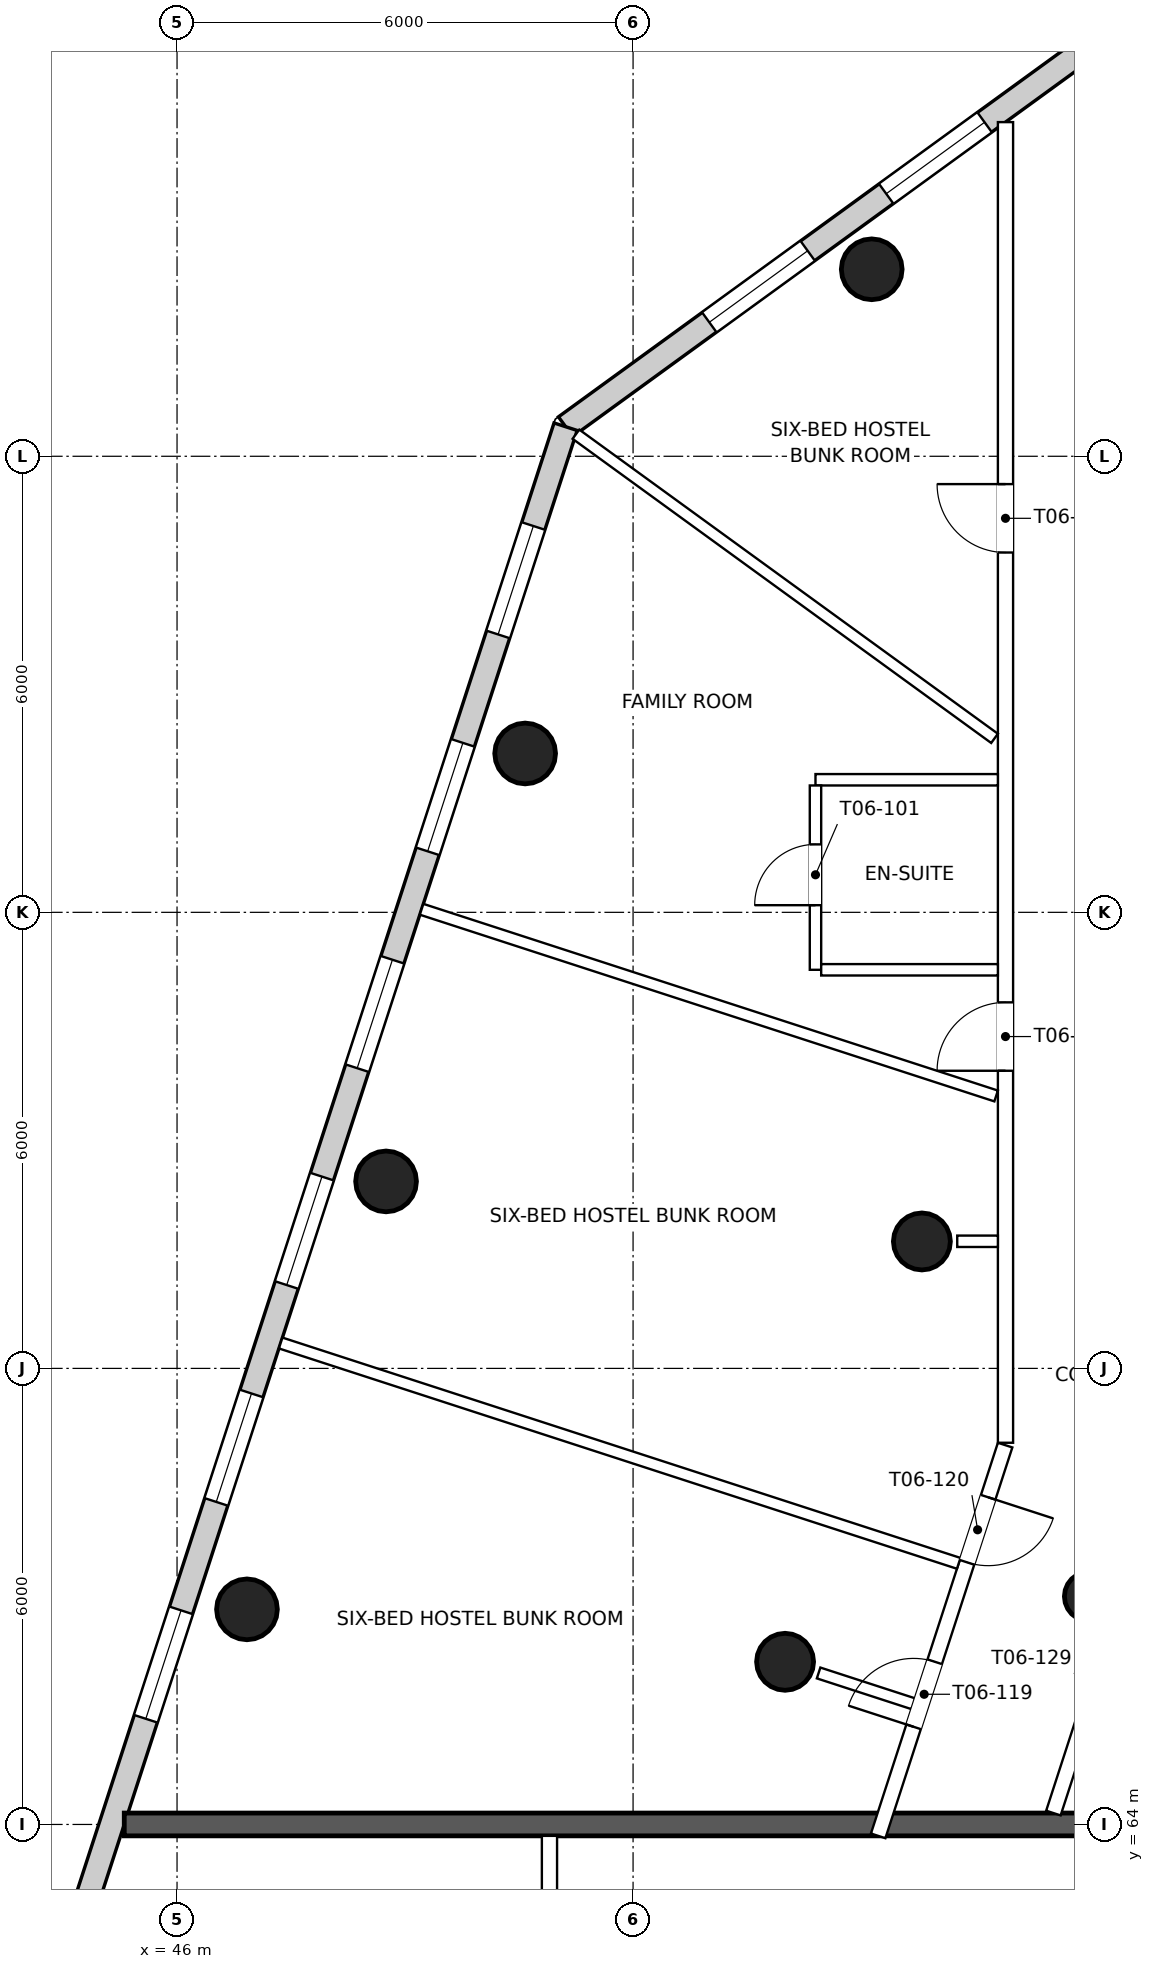
"""IFC4 building model, lengths in metres.
Left out: names, types, materials, properties, quantities, classifications, styles, units other than length and angle.
Written with IfcOpenShell. Run it as: python <this file> out.ifc"""

import sys

from ifc_helpers import new_model, si_unit, direction, frame, frame_2d, origin, origin_2d, place, context, subcontext, project, spatial, rectangle, circle, extrude, element, fill, save


model = new_model("IFC4")
c1 = context("Model", 3, precision=1e-05, world=origin(), true_north=direction((0.0, 1.0)))
c2 = subcontext(c1, "Body", "Model", "MODEL_VIEW")
j1 = project(units=[si_unit("LENGTHUNIT", "METRE"), si_unit("PLANEANGLEUNIT", "RADIAN")], contexts=[c1])
p1 = place(None, origin())
s1 = spatial("IfcSite", under=j1, at=p1, CompositionType="ELEMENT")
p2 = place(p1, origin())
s2 = spatial("IfcBuilding", under=s1, at=p2, CompositionType="ELEMENT")
p3 = place(p2, frame((0.0, 0.0, 98.6)))
s3 = spatial("IfcBuildingStorey", under=s2, at=p3, CompositionType="ELEMENT", Elevation=98.6)
for number, where, z_axis, x_axis in (
    (1, (55.14, 84.46, 0.0), (0.0, 0.0, 1.0), (1.0, 0.0, 0.0)),
    (2, (50.58, 78.09, 0.0), (0.0, 0.0, 1.0), (1.0, 0.0, 0.0)),
    (3, (48.75, 72.46, 0.0), (0.0, 0.0, 1.0), (1.0, 0.0, 0.0)),
    (4, (46.92, 66.83, 0.0), (0.0, 0.0, 1.0), (1.0, 0.0, 0.0)),
):
    element("IfcColumn", number, at=place(p3, frame(where, z_axis=z_axis, x_axis=x_axis)), inside=s3, PredefinedType="COLUMN", context=c2, shape_type="SweptSolid", body=[
        extrude(circle(Radius=0.4, at=origin_2d()), origin(), (0.0, 0.0, 1.0), 3.9),
    ])
for number, where, z_axis, x_axis in (
    (5, (55.8, 71.67, 0.0), (0.0, 0.0, 1.0), (1.0, 0.0, 0.0)),
    (6, (54.0, 66.14, 0.0), (0.0, 0.0, 1.0), (1.0, 0.0, 0.0)),
):
    element("IfcColumn", number, at=place(p3, frame(where, z_axis=z_axis, x_axis=x_axis)), inside=s3, PredefinedType="COLUMN", context=c2, shape_type="SweptSolid", body=[
        extrude(circle(Radius=0.375, at=origin_2d()), origin(), (0.0, 0.0, 1.0), 3.9),
    ])
p4 = place(p3, frame((58.0, 67.0, 0.0), z_axis=(0.0, 0.0, 1.0), x_axis=(1.0, 0.0, 0.0)))
e7 = element("IfcColumn", 7, at=p4, inside=s3, PredefinedType="COLUMN", context=c2, shape_type="SweptSolid", body=[
    extrude(circle(Radius=0.325, at=origin_2d()), origin(), (0.0, 0.0, 1.0), 3.9),
])
p5 = place(p3, frame((58.615, 87.84, 0.0), z_axis=(0.0, 0.0, 1.0), x_axis=(-0.809009213142, -0.587795962092, 0.0)))
e8 = element("IfcWall", 8, at=p5, inside=s3, PredefinedType="SOLIDWALL", context=c2, shape_type="SweptSolid", body=[
    extrude(rectangle(XDim=9.274, YDim=0.32, at=frame_2d((4.637, 0.0))), origin(), (0.0, 0.0, 1.0), 3.6),
])
p6 = place(p5, frame((2.46, 0.0, 0.9)))
e9 = element("IfcOpeningElement", 9, at=p6, cuts=e8, PredefinedType="OPENING", context=c2, shape_type="SweptSolid", body=[
    extrude(rectangle(XDim=1.6, YDim=1.8, at=frame_2d((0.8, 0.9))), frame((0.0, 0.17, 0.0), z_axis=(0.0, -1.0, 0.0), x_axis=(1.0, 0.0, 0.0)), (0.0, 0.0, 1.0), 0.34),
])
p7 = place(p5, frame((5.337, 0.0, 0.9)))
e10 = element("IfcOpeningElement", 10, at=p7, cuts=e8, PredefinedType="OPENING", context=c2, shape_type="SweptSolid", body=[
    extrude(rectangle(XDim=1.6, YDim=1.8, at=frame_2d((0.8, 0.9))), frame((0.0, 0.17, 0.0), z_axis=(0.0, -1.0, 0.0), x_axis=(1.0, 0.0, 0.0)), (0.0, 0.0, 1.0), 0.34),
])
p8 = place(p3, frame((51.112, 82.389, 0.0), z_axis=(0.0, 0.0, 1.0), x_axis=(-0.309018577053, -0.95105600205, 0.0)))
e11 = element("IfcWall", 11, at=p8, inside=s3, PredefinedType="SOLIDWALL", context=c2, shape_type="SweptSolid", body=[
    extrude(rectangle(XDim=22.247, YDim=0.32, at=frame_2d((11.124, 0.0))), origin(), (0.0, 0.0, 1.0), 3.6),
])
p9 = place(p8, frame((1.374, 0.0, 0.9)))
e12 = element("IfcOpeningElement", 12, at=p9, cuts=e11, PredefinedType="OPENING", context=c2, shape_type="SweptSolid", body=[
    extrude(rectangle(XDim=1.5, YDim=1.8, at=frame_2d((0.75, 0.9))), frame((0.0, 0.17, 0.0), z_axis=(0.0, -1.0, 0.0), x_axis=(1.0, 0.0, 0.0)), (0.0, 0.0, 1.0), 0.34),
])
p10 = place(p8, frame((4.374, 0.0, 0.9)))
e13 = element("IfcOpeningElement", 13, at=p10, cuts=e11, PredefinedType="OPENING", context=c2, shape_type="SweptSolid", body=[
    extrude(rectangle(XDim=1.5, YDim=1.8, at=frame_2d((0.75, 0.9))), frame((0.0, 0.17, 0.0), z_axis=(0.0, -1.0, 0.0), x_axis=(1.0, 0.0, 0.0)), (0.0, 0.0, 1.0), 0.34),
])
p11 = place(p8, frame((7.374, 0.0, 0.9)))
e14 = element("IfcOpeningElement", 14, at=p11, cuts=e11, PredefinedType="OPENING", context=c2, shape_type="SweptSolid", body=[
    extrude(rectangle(XDim=1.5, YDim=1.8, at=frame_2d((0.75, 0.9))), frame((0.0, 0.17, 0.0), z_axis=(0.0, -1.0, 0.0), x_axis=(1.0, 0.0, 0.0)), (0.0, 0.0, 1.0), 0.34),
])
p12 = place(p8, frame((10.374, 0.0, 0.9)))
e15 = element("IfcOpeningElement", 15, at=p12, cuts=e11, PredefinedType="OPENING", context=c2, shape_type="SweptSolid", body=[
    extrude(rectangle(XDim=1.5, YDim=1.8, at=frame_2d((0.75, 0.9))), frame((0.0, 0.17, 0.0), z_axis=(0.0, -1.0, 0.0), x_axis=(1.0, 0.0, 0.0)), (0.0, 0.0, 1.0), 0.34),
])
p13 = place(p8, frame((13.374, 0.0, 0.9)))
e16 = element("IfcOpeningElement", 16, at=p13, cuts=e11, PredefinedType="OPENING", context=c2, shape_type="SweptSolid", body=[
    extrude(rectangle(XDim=1.5, YDim=1.8, at=frame_2d((0.75, 0.9))), frame((0.0, 0.17, 0.0), z_axis=(0.0, -1.0, 0.0), x_axis=(1.0, 0.0, 0.0)), (0.0, 0.0, 1.0), 0.34),
])
p14 = place(p8, frame((16.374, 0.0, 0.9)))
e17 = element("IfcOpeningElement", 17, at=p14, cuts=e11, PredefinedType="OPENING", context=c2, shape_type="SweptSolid", body=[
    extrude(rectangle(XDim=1.5, YDim=1.8, at=frame_2d((0.75, 0.9))), frame((0.0, 0.17, 0.0), z_axis=(0.0, -1.0, 0.0), x_axis=(1.0, 0.0, 0.0)), (0.0, 0.0, 1.0), 0.34),
])
p15 = place(p3, frame((45.306, 64.0, 0.0), z_axis=(0.0, 0.0, 1.0), x_axis=(1.0, 0.0, 0.0)))
e18 = element("IfcWall", 18, at=p15, inside=s3, PredefinedType="PARTITIONING", context=c2, shape_type="SweptSolid", body=[
    extrude(rectangle(XDim=49.389, YDim=0.3, at=frame_2d((24.694, 0.0))), origin(), (0.0, 0.0, 1.0), 2.9),
])
p16 = place(p15, frame((16.331, 0.0, 0.0)))
e19 = element("IfcOpeningElement", 19, at=p16, cuts=e18, PredefinedType="OPENING", context=c2, shape_type="SweptSolid", body=[
    extrude(rectangle(XDim=2.0, YDim=2.1, at=frame_2d((1.0, 1.05))), frame((0.0, 0.16, 0.0), z_axis=(0.0, -1.0, 0.0), x_axis=(1.0, 0.0, 0.0)), (0.0, 0.0, 1.0), 0.32),
])
p17 = place(p15, frame((31.058, 0.0, 0.0)))
e20 = element("IfcOpeningElement", 20, at=p17, cuts=e18, PredefinedType="OPENING", context=c2, shape_type="SweptSolid", body=[
    extrude(rectangle(XDim=2.0, YDim=2.1, at=frame_2d((1.0, 1.05))), frame((0.0, 0.16, 0.0), z_axis=(0.0, -1.0, 0.0), x_axis=(1.0, 0.0, 0.0)), (0.0, 0.0, 1.0), 0.32),
])
p18 = place(p3, frame((55.225, 63.85, 0.0), z_axis=(0.0, 0.0, 1.0), x_axis=(0.309037048815, 0.951049999979, 0.0)))
e21 = element("IfcWall", 21, at=p18, inside=s3, PredefinedType="PARTITIONING", context=c2, shape_type="SweptSolid", body=[
    extrude(rectangle(XDim=5.405, YDim=0.2, at=frame_2d((2.703, 0.0))), origin(), (0.0, 0.0, 1.0), 3.6),
])
p19 = place(p18, frame((1.509, 0.0, 0.0)))
e22 = element("IfcOpeningElement", 22, at=p19, cuts=e21, PredefinedType="OPENING", context=c2, shape_type="SweptSolid", body=[
    extrude(rectangle(XDim=0.9, YDim=2.1, at=frame_2d((0.45, 1.05))), frame((0.0, 0.11, 0.0), z_axis=(0.0, -1.0, 0.0), x_axis=(1.0, 0.0, 0.0)), (0.0, 0.0, 1.0), 0.22),
])
p20 = place(p18, frame((3.784, 0.0, 0.0)))
e23 = element("IfcOpeningElement", 23, at=p20, cuts=e21, PredefinedType="OPENING", context=c2, shape_type="SweptSolid", body=[
    extrude(rectangle(XDim=0.9, YDim=2.1, at=frame_2d((0.45, 1.05))), frame((0.0, 0.11, 0.0), z_axis=(0.0, -1.0, 0.0), x_axis=(1.0, 0.0, 0.0)), (0.0, 0.0, 1.0), 0.22),
])
p21 = place(p3, frame((56.9, 69.022, 0.0), z_axis=(0.0, 0.0, 1.0), x_axis=(0.0, 1.0, 0.0)))
e24 = element("IfcWall", 24, at=p21, inside=s3, PredefinedType="PARTITIONING", context=c2, shape_type="SweptSolid", body=[
    extrude(rectangle(XDim=17.375, YDim=0.2, at=frame_2d((8.687, 0.0))), origin(), (0.0, 0.0, 1.0), 3.0),
])
p22 = place(p21, frame((4.894, 0.0, 0.0)))
e25 = element("IfcOpeningElement", 25, at=p22, cuts=e24, PredefinedType="OPENING", context=c2, shape_type="SweptSolid", body=[
    extrude(rectangle(XDim=0.9, YDim=2.1, at=frame_2d((0.45, 1.05))), frame((0.0, 0.11, 0.0), z_axis=(0.0, -1.0, 0.0), x_axis=(1.0, 0.0, 0.0)), (0.0, 0.0, 1.0), 0.22),
])
p23 = place(p21, frame((11.712, 0.0, 0.0)))
e26 = element("IfcOpeningElement", 26, at=p23, cuts=e24, PredefinedType="OPENING", context=c2, shape_type="SweptSolid", body=[
    extrude(rectangle(XDim=0.9, YDim=2.1, at=frame_2d((0.45, 1.05))), frame((0.0, 0.11, 0.0), z_axis=(0.0, -1.0, 0.0), x_axis=(1.0, 0.0, 0.0)), (0.0, 0.0, 1.0), 0.22),
])
p24 = place(p3, frame((50.9, 55.9, 0.0), z_axis=(0.0, 0.0, 1.0), x_axis=(0.0, 1.0, 0.0)))
e27 = element("IfcWall", 27, at=p24, inside=s3, PredefinedType="PARTITIONING", context=c2, shape_type="SweptSolid", body=[
    extrude(rectangle(XDim=7.95, YDim=0.2, at=frame_2d((3.975, 0.0))), origin(), (0.0, 0.0, 1.0), 3.6),
])
p25 = place(p24, frame((2.165, 0.0, 0.0)))
e28 = element("IfcOpeningElement", 28, at=p25, cuts=e27, PredefinedType="OPENING", context=c2, shape_type="SweptSolid", body=[
    extrude(rectangle(XDim=0.9, YDim=2.1, at=frame_2d((0.45, 1.05))), frame((0.0, 0.11, 0.0), z_axis=(0.0, -1.0, 0.0), x_axis=(1.0, 0.0, 0.0)), (0.0, 0.0, 1.0), 0.22),
])
p26 = place(p24, frame((6.228, 0.0, 0.0)))
e29 = element("IfcOpeningElement", 29, at=p26, cuts=e27, PredefinedType="OPENING", context=c2, shape_type="SweptSolid", body=[
    extrude(rectangle(XDim=0.9, YDim=2.1, at=frame_2d((0.45, 1.05))), frame((0.0, 0.11, 0.0), z_axis=(0.0, -1.0, 0.0), x_axis=(1.0, 0.0, 0.0)), (0.0, 0.0, 1.0), 0.22),
])
p27 = place(p3, frame((59.051, 68.831, 0.0), z_axis=(0.0, 0.0, 1.0), x_axis=(-0.309031112369, -0.951051928965, 0.0)))
e30 = element("IfcWall", 30, at=p27, inside=s3, PredefinedType="PARTITIONING", context=c2, shape_type="SweptSolid", body=[
    extrude(rectangle(XDim=4.922, YDim=0.2, at=frame_2d((2.461, 0.0))), origin(), (0.0, 0.0, 1.0), 3.6),
])
p28 = place(p27, frame((2.665, 0.0, 0.0)))
e31 = element("IfcOpeningElement", 31, at=p28, cuts=e30, PredefinedType="OPENING", context=c2, shape_type="SweptSolid", body=[
    extrude(rectangle(XDim=0.9, YDim=2.1, at=frame_2d((0.45, 1.05))), frame((0.0, 0.11, 0.0), z_axis=(0.0, -1.0, 0.0), x_axis=(1.0, 0.0, 0.0)), (0.0, 0.0, 1.0), 0.22),
])
p29 = place(p3, frame((51.248, 82.29, 0.0), z_axis=(0.0, 0.0, 1.0), x_axis=(0.809035290939, -0.587760068408, 0.0)))
e32 = element("IfcWall", 32, at=p29, inside=s3, PredefinedType="PARTITIONING", context=c2, shape_type="SweptSolid", body=[
    extrude(rectangle(XDim=6.808, YDim=0.15, at=frame_2d((3.404, 0.0))), origin(), (0.0, 0.0, 1.0), 3.1),
])
p30 = place(p3, frame((49.218, 76.04, 0.0), z_axis=(0.0, 0.0, 1.0), x_axis=(0.951057993494, -0.309012447986, 0.0)))
e33 = element("IfcWall", 33, at=p30, inside=s3, PredefinedType="PARTITIONING", context=c2, shape_type="SweptSolid", body=[
    extrude(rectangle(XDim=7.948, YDim=0.15, at=frame_2d((3.974, 0.0))), origin(), (0.0, 0.0, 1.0), 3.1),
])
p31 = place(p3, frame((47.364, 70.334, 0.0), z_axis=(0.0, 0.0, 1.0), x_axis=(0.951060843481, -0.309003676349, 0.0)))
e34 = element("IfcWall", 34, at=p31, inside=s3, PredefinedType="PARTITIONING", context=c2, shape_type="SweptSolid", body=[
    extrude(rectangle(XDim=9.38, YDim=0.15, at=frame_2d((4.69, 0.0))), origin(), (0.0, 0.0, 1.0), 3.0),
])
p32 = place(p3, frame((56.8, 77.744, 0.0), z_axis=(0.0, 0.0, 1.0), x_axis=(-1.0, 0.0, 0.0)))
e35 = element("IfcWall", 35, at=p32, inside=s3, PredefinedType="PARTITIONING", context=c2, shape_type="SweptSolid", body=[
    extrude(rectangle(XDim=2.4, YDim=0.15, at=frame_2d((1.2, 0.0))), origin(), (0.0, 0.0, 1.0), 3.6),
])
p33 = place(p3, frame((54.4, 75.244, 0.0), z_axis=(0.0, 0.0, 1.0), x_axis=(0.0, 1.0, 0.0)))
e36 = element("IfcWall", 36, at=p33, inside=s3, PredefinedType="PARTITIONING", context=c2, shape_type="SweptSolid", body=[
    extrude(rectangle(XDim=2.425, YDim=0.15, at=frame_2d((1.212, 0.0))), origin(), (0.0, 0.0, 1.0), 3.6),
])
p34 = place(p33, frame((0.85, 0.0, 0.0)))
e37 = element("IfcOpeningElement", 37, at=p34, cuts=e36, PredefinedType="OPENING", context=c2, shape_type="SweptSolid", body=[
    extrude(rectangle(XDim=0.8, YDim=2.1, at=frame_2d((0.4, 1.05))), frame((0.0, 0.085, 0.0), z_axis=(0.0, -1.0, 0.0), x_axis=(1.0, 0.0, 0.0)), (0.0, 0.0, 1.0), 0.17),
])
p35 = place(p3, frame((56.8, 75.244, 0.0), z_axis=(0.0, 0.0, 1.0), x_axis=(-1.0, 0.0, 0.0)))
e38 = element("IfcWall", 38, at=p35, inside=s3, PredefinedType="PARTITIONING", context=c2, shape_type="SweptSolid", body=[
    extrude(rectangle(XDim=2.325, YDim=0.15, at=frame_2d((1.163, 0.0))), origin(), (0.0, 0.0, 1.0), 3.6),
])
p36 = place(p3, frame((56.265, 71.672, 0.0), z_axis=(0.0, 0.0, 1.0), x_axis=(1.0, 0.0, 0.0)))
e39 = element("IfcWall", 39, at=p36, inside=s3, PredefinedType="PARTITIONING", context=c2, shape_type="SweptSolid", body=[
    extrude(rectangle(XDim=0.535, YDim=0.15, at=frame_2d((0.268, 0.0))), origin(), (0.0, 0.0, 1.0), 3.0),
])
p37 = place(p3, frame((54.441, 65.993, 0.0), z_axis=(0.0, 0.0, 1.0), x_axis=(0.951046418515, -0.309048070419, 0.0)))
e40 = element("IfcWall", 40, at=p37, inside=s3, PredefinedType="PARTITIONING", context=c2, shape_type="SweptSolid", body=[
    extrude(rectangle(XDim=1.307, YDim=0.15, at=frame_2d((0.654, 0.0))), origin(), (0.0, 0.0, 1.0), 3.6),
])
p38 = place(p6, origin())
e41 = element("IfcWindow", 41, at=p38, inside=s3, PartitioningType="SINGLE_PANEL", PredefinedType="WINDOW", context=c2, shape_type="SweptSolid", body=[
    extrude(rectangle(XDim=1.6, YDim=1.8, at=frame_2d((0.8, 0.9))), frame((0.0, 0.07, 0.0), z_axis=(0.0, -1.0, 0.0), x_axis=(1.0, 0.0, 0.0)), (0.0, 0.0, 1.0), 0.06),
])
fill(e9, e41)
p39 = place(p7, origin())
e42 = element("IfcWindow", 42, at=p39, inside=s3, PartitioningType="SINGLE_PANEL", PredefinedType="WINDOW", context=c2, shape_type="SweptSolid", body=[
    extrude(rectangle(XDim=1.6, YDim=1.8, at=frame_2d((0.8, 0.9))), frame((0.0, 0.07, 0.0), z_axis=(0.0, -1.0, 0.0), x_axis=(1.0, 0.0, 0.0)), (0.0, 0.0, 1.0), 0.06),
])
fill(e10, e42)
p40 = place(p9, origin())
e43 = element("IfcWindow", 43, at=p40, inside=s3, PartitioningType="SINGLE_PANEL", PredefinedType="WINDOW", context=c2, shape_type="SweptSolid", body=[
    extrude(rectangle(XDim=1.5, YDim=1.8, at=frame_2d((0.75, 0.9))), frame((0.0, 0.07, 0.0), z_axis=(0.0, -1.0, 0.0), x_axis=(1.0, 0.0, 0.0)), (0.0, 0.0, 1.0), 0.06),
])
fill(e12, e43)
p41 = place(p10, origin())
e44 = element("IfcWindow", 44, at=p41, inside=s3, PartitioningType="SINGLE_PANEL", PredefinedType="WINDOW", context=c2, shape_type="SweptSolid", body=[
    extrude(rectangle(XDim=1.5, YDim=1.8, at=frame_2d((0.75, 0.9))), frame((0.0, 0.07, 0.0), z_axis=(0.0, -1.0, 0.0), x_axis=(1.0, 0.0, 0.0)), (0.0, 0.0, 1.0), 0.06),
])
fill(e13, e44)
p42 = place(p11, origin())
e45 = element("IfcWindow", 45, at=p42, inside=s3, PartitioningType="SINGLE_PANEL", PredefinedType="WINDOW", context=c2, shape_type="SweptSolid", body=[
    extrude(rectangle(XDim=1.5, YDim=1.8, at=frame_2d((0.75, 0.9))), frame((0.0, 0.07, 0.0), z_axis=(0.0, -1.0, 0.0), x_axis=(1.0, 0.0, 0.0)), (0.0, 0.0, 1.0), 0.06),
])
fill(e14, e45)
p43 = place(p12, origin())
e46 = element("IfcWindow", 46, at=p43, inside=s3, PartitioningType="SINGLE_PANEL", PredefinedType="WINDOW", context=c2, shape_type="SweptSolid", body=[
    extrude(rectangle(XDim=1.5, YDim=1.8, at=frame_2d((0.75, 0.9))), frame((0.0, 0.07, 0.0), z_axis=(0.0, -1.0, 0.0), x_axis=(1.0, 0.0, 0.0)), (0.0, 0.0, 1.0), 0.06),
])
fill(e15, e46)
p44 = place(p13, origin())
e47 = element("IfcWindow", 47, at=p44, inside=s3, PartitioningType="SINGLE_PANEL", PredefinedType="WINDOW", context=c2, shape_type="SweptSolid", body=[
    extrude(rectangle(XDim=1.5, YDim=1.8, at=frame_2d((0.75, 0.9))), frame((0.0, 0.07, 0.0), z_axis=(0.0, -1.0, 0.0), x_axis=(1.0, 0.0, 0.0)), (0.0, 0.0, 1.0), 0.06),
])
fill(e16, e47)
p45 = place(p14, origin())
e48 = element("IfcWindow", 48, at=p45, inside=s3, PartitioningType="SINGLE_PANEL", PredefinedType="WINDOW", context=c2, shape_type="SweptSolid", body=[
    extrude(rectangle(XDim=1.5, YDim=1.8, at=frame_2d((0.75, 0.9))), frame((0.0, 0.07, 0.0), z_axis=(0.0, -1.0, 0.0), x_axis=(1.0, 0.0, 0.0)), (0.0, 0.0, 1.0), 0.06),
])
fill(e17, e48)
p46 = place(p34, origin())
e49 = element("IfcDoor", 49, at=p46, inside=s3, OperationType="SINGLE_SWING_LEFT", PredefinedType="DOOR", context=c2, shape_type="SweptSolid", body=[
    extrude(rectangle(XDim=0.8, YDim=2.1, at=frame_2d((0.4, 1.05))), frame((0.0, 0.025, 0.0), z_axis=(0.0, -1.0, 0.0), x_axis=(1.0, 0.0, 0.0)), (0.0, 0.0, 1.0), 0.05),
])
fill(e37, e49)
p47 = place(p19, origin())
e50 = element("IfcDoor", 50, at=p47, inside=s3, OperationType="SINGLE_SWING_LEFT", PredefinedType="DOOR", context=c2, shape_type="SweptSolid", body=[
    extrude(rectangle(XDim=0.9, YDim=2.1, at=frame_2d((0.45, 1.05))), frame((0.0, 0.025, 0.0), z_axis=(0.0, -1.0, 0.0), x_axis=(1.0, 0.0, 0.0)), (0.0, 0.0, 1.0), 0.05),
])
fill(e22, e50)
p48 = place(p20, frame((0.9, 0.0, 0.0), z_axis=(0.0, 0.0, 1.0), x_axis=(-1.0, 0.0, 0.0)))
e51 = element("IfcDoor", 51, at=p48, inside=s3, OperationType="SINGLE_SWING_LEFT", PredefinedType="DOOR", context=c2, shape_type="SweptSolid", body=[
    extrude(rectangle(XDim=0.9, YDim=2.1, at=frame_2d((0.45, 1.05))), frame((0.0, 0.025, 0.0), z_axis=(0.0, -1.0, 0.0), x_axis=(1.0, 0.0, 0.0)), (0.0, 0.0, 1.0), 0.05),
])
fill(e23, e51)
p49 = place(p22, origin())
e52 = element("IfcDoor", 52, at=p49, inside=s3, OperationType="SINGLE_SWING_LEFT", PredefinedType="DOOR", context=c2, shape_type="SweptSolid", body=[
    extrude(rectangle(XDim=0.9, YDim=2.1, at=frame_2d((0.45, 1.05))), frame((0.0, 0.025, 0.0), z_axis=(0.0, -1.0, 0.0), x_axis=(1.0, 0.0, 0.0)), (0.0, 0.0, 1.0), 0.05),
])
fill(e25, e52)
p50 = place(p23, origin())
e53 = element("IfcDoor", 53, at=p50, inside=s3, OperationType="SINGLE_SWING_RIGHT", PredefinedType="DOOR", context=c2, shape_type="SweptSolid", body=[
    extrude(rectangle(XDim=0.9, YDim=2.1, at=frame_2d((0.45, 1.05))), frame((0.0, 0.025, 0.0), z_axis=(0.0, -1.0, 0.0), x_axis=(1.0, 0.0, 0.0)), (0.0, 0.0, 1.0), 0.05),
])
fill(e26, e53)
save(model, sys.argv[1])
